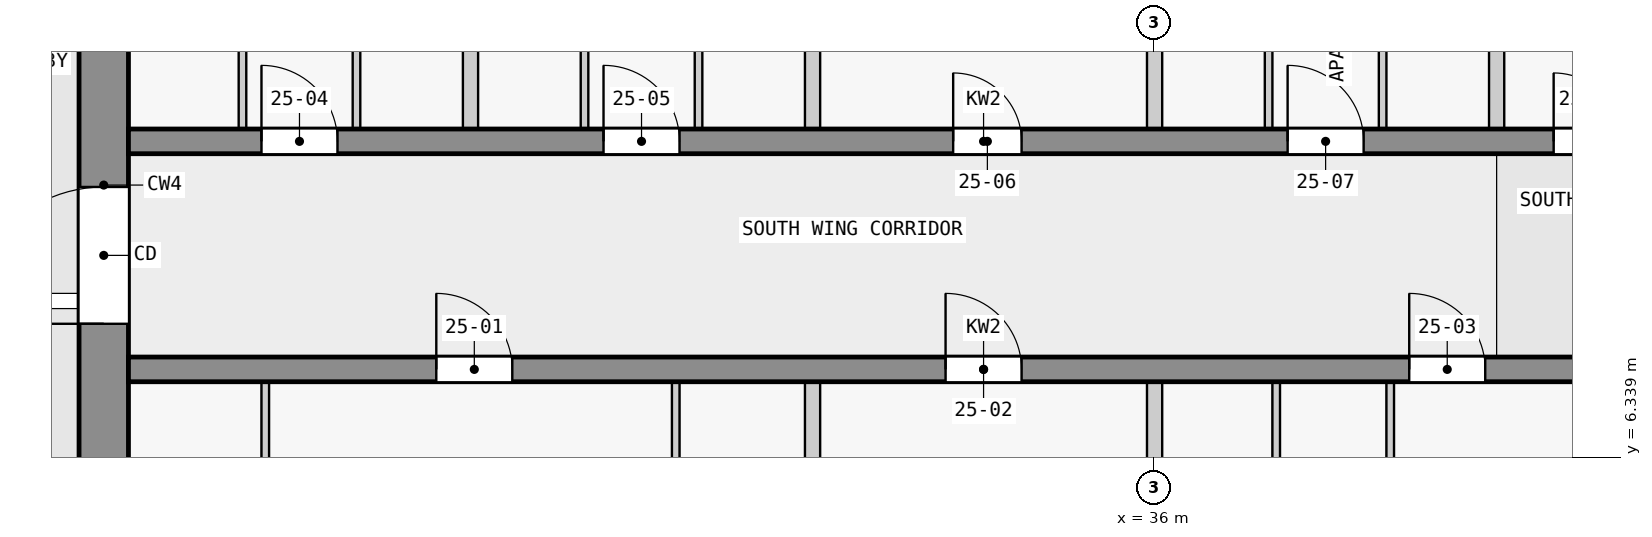
"""IFC4 building model, lengths in metres.
Left out: names, types, materials, properties, quantities, classifications, styles, units other than length and angle.
Written with IfcOpenShell. Run it as: python <this file> out.ifc"""

import sys

from ifc_helpers import new_model, si_unit, direction, frame, frame_2d, origin, place, context, subcontext, project, spatial, rectangle, extrude, element, fill, save


model = new_model("IFC4")
c1 = context("Model", 3, precision=1e-05, world=origin(), true_north=direction((0.0, 1.0)))
c2 = subcontext(c1, "Body", "Model", "MODEL_VIEW")
j1 = project(units=[si_unit("LENGTHUNIT", "METRE"), si_unit("PLANEANGLEUNIT", "RADIAN")], contexts=[c1])
p1 = place(None, origin())
s1 = spatial("IfcSite", under=j1, at=p1, CompositionType="ELEMENT")
p2 = place(p1, origin())
s2 = spatial("IfcBuilding", under=s1, at=p2, CompositionType="ELEMENT")
p3 = place(p2, frame((0.0, 0.0, 99.3)))
s3 = spatial("IfcBuildingStorey", under=s2, at=p3, CompositionType="ELEMENT", Elevation=99.3)
p4 = place(p3, frame((22.175, 2.5, 0.0), z_axis=(0.0, 0.0, 1.0), x_axis=(0.0, 1.0, 0.0)))
e1 = element("IfcWall", 1, at=p4, inside=s3, PredefinedType="SHEAR", context=c2, shape_type="SweptSolid", body=[
    extrude(rectangle(XDim=14.85, YDim=0.65, at=frame_2d((7.425, 0.0))), origin(), (0.0, 0.0, 1.0), 3.25),
])
p5 = place(p4, frame((5.6, 0.0, 0.0)))
e2 = element("IfcOpeningElement", 2, at=p5, cuts=e1, PredefinedType="OPENING", context=c2, shape_type="SweptSolid", body=[
    extrude(rectangle(XDim=1.8, YDim=2.1, at=frame_2d((0.9, 1.05))), frame((0.0, 0.335, 0.0), z_axis=(0.0, -1.0, 0.0), x_axis=(1.0, 0.0, 0.0)), (0.0, 0.0, 1.0), 0.67),
])
p6 = place(p3, frame((22.5, 7.5, 0.0), z_axis=(0.0, 0.0, 1.0), x_axis=(1.0, 0.0, 0.0)))
e3 = element("IfcWall", 3, at=p6, inside=s3, PredefinedType="SHEAR", context=c2, shape_type="SweptSolid", body=[
    extrude(rectangle(XDim=22.5, YDim=0.325, at=frame_2d((11.25, 0.0))), origin(), (0.0, 0.0, 1.0), 3.25),
])
p7 = place(p6, frame((4.05, 0.0, 0.0)))
e4 = element("IfcOpeningElement", 4, at=p7, cuts=e3, PredefinedType="OPENING", context=c2, shape_type="SweptSolid", body=[
    extrude(rectangle(XDim=1.0, YDim=2.1, at=frame_2d((0.5, 1.05))), frame((0.0, 0.172, 0.0), z_axis=(0.0, -1.0, 0.0), x_axis=(1.0, 0.0, 0.0)), (0.0, 0.0, 1.0), 0.345),
])
p8 = place(p6, frame((10.75, 0.0, 0.0)))
e5 = element("IfcOpeningElement", 5, at=p8, cuts=e3, PredefinedType="OPENING", context=c2, shape_type="SweptSolid", body=[
    extrude(rectangle(XDim=1.0, YDim=2.1, at=frame_2d((0.5, 1.05))), frame((0.0, 0.172, 0.0), z_axis=(0.0, -1.0, 0.0), x_axis=(1.0, 0.0, 0.0)), (0.0, 0.0, 1.0), 0.345),
])
p9 = place(p6, frame((16.85, 0.0, 0.0)))
e6 = element("IfcOpeningElement", 6, at=p9, cuts=e3, PredefinedType="OPENING", context=c2, shape_type="SweptSolid", body=[
    extrude(rectangle(XDim=1.0, YDim=2.1, at=frame_2d((0.5, 1.05))), frame((0.0, 0.172, 0.0), z_axis=(0.0, -1.0, 0.0), x_axis=(1.0, 0.0, 0.0)), (0.0, 0.0, 1.0), 0.345),
])
p10 = place(p3, frame((22.5, 10.5, 0.0), z_axis=(0.0, 0.0, 1.0), x_axis=(1.0, 0.0, 0.0)))
e7 = element("IfcWall", 7, at=p10, inside=s3, PredefinedType="SHEAR", context=c2, shape_type="SweptSolid", body=[
    extrude(rectangle(XDim=22.5, YDim=0.325, at=frame_2d((11.25, 0.0))), origin(), (0.0, 0.0, 1.0), 3.25),
])
p11 = place(p10, frame((1.75, 0.0, 0.0)))
e8 = element("IfcOpeningElement", 8, at=p11, cuts=e7, PredefinedType="OPENING", context=c2, shape_type="SweptSolid", body=[
    extrude(rectangle(XDim=1.0, YDim=2.1, at=frame_2d((0.5, 1.05))), frame((0.0, 0.172, 0.0), z_axis=(0.0, -1.0, 0.0), x_axis=(1.0, 0.0, 0.0)), (0.0, 0.0, 1.0), 0.345),
])
p12 = place(p10, frame((6.25, 0.0, 0.0)))
e9 = element("IfcOpeningElement", 9, at=p12, cuts=e7, PredefinedType="OPENING", context=c2, shape_type="SweptSolid", body=[
    extrude(rectangle(XDim=1.0, YDim=2.1, at=frame_2d((0.5, 1.05))), frame((0.0, 0.172, 0.0), z_axis=(0.0, -1.0, 0.0), x_axis=(1.0, 0.0, 0.0)), (0.0, 0.0, 1.0), 0.345),
])
p13 = place(p10, frame((10.85, 0.0, 0.0)))
e10 = element("IfcOpeningElement", 10, at=p13, cuts=e7, PredefinedType="OPENING", context=c2, shape_type="SweptSolid", body=[
    extrude(rectangle(XDim=0.9, YDim=2.1, at=frame_2d((0.45, 1.05))), frame((0.0, 0.172, 0.0), z_axis=(0.0, -1.0, 0.0), x_axis=(1.0, 0.0, 0.0)), (0.0, 0.0, 1.0), 0.345),
])
p14 = place(p10, frame((15.25, 0.0, 0.0)))
e11 = element("IfcOpeningElement", 11, at=p14, cuts=e7, PredefinedType="OPENING", context=c2, shape_type="SweptSolid", body=[
    extrude(rectangle(XDim=1.0, YDim=2.1, at=frame_2d((0.5, 1.05))), frame((0.0, 0.172, 0.0), z_axis=(0.0, -1.0, 0.0), x_axis=(1.0, 0.0, 0.0)), (0.0, 0.0, 1.0), 0.345),
])
p15 = place(p10, frame((18.75, 0.0, 0.0)))
e12 = element("IfcOpeningElement", 12, at=p15, cuts=e7, PredefinedType="OPENING", context=c2, shape_type="SweptSolid", body=[
    extrude(rectangle(XDim=0.9, YDim=2.1, at=frame_2d((0.45, 1.05))), frame((0.0, 0.172, 0.0), z_axis=(0.0, -1.0, 0.0), x_axis=(1.0, 0.0, 0.0)), (0.0, 0.0, 1.0), 0.345),
])
p16 = place(p10, frame((20.95, 0.0, 0.0)))
e13 = element("IfcOpeningElement", 13, at=p16, cuts=e7, PredefinedType="OPENING", context=c2, shape_type="SweptSolid", body=[
    extrude(rectangle(XDim=1.0, YDim=2.1, at=frame_2d((0.5, 1.05))), frame((0.0, 0.172, 0.0), z_axis=(0.0, -1.0, 0.0), x_axis=(1.0, 0.0, 0.0)), (0.0, 0.0, 1.0), 0.345),
])
p17 = place(p3, frame((24.0, 10.663, 0.0), z_axis=(0.0, 0.0, 1.0), x_axis=(0.0, 1.0, 0.0)))
e14 = element("IfcWall", 14, at=p17, inside=s3, PredefinedType="PARTITIONING", context=c2, shape_type="SweptSolid", body=[
    extrude(rectangle(XDim=3.4, YDim=0.1, at=frame_2d((1.7, 0.0))), origin(), (0.0, 0.0, 1.0), 3.25),
])
p18 = place(p17, frame((1.25, 0.0, 0.0)))
e15 = element("IfcOpeningElement", 15, at=p18, cuts=e14, PredefinedType="OPENING", context=c2, shape_type="SweptSolid", body=[
    extrude(rectangle(XDim=0.9, YDim=2.1, at=frame_2d((0.45, 1.05))), frame((0.0, 0.06, 0.0), z_axis=(0.0, -1.0, 0.0), x_axis=(1.0, 0.0, 0.0)), (0.0, 0.0, 1.0), 0.12),
])
p19 = place(p3, frame((24.3, 3.938, 0.0), z_axis=(0.0, 0.0, 1.0), x_axis=(0.0, 1.0, 0.0)))
e16 = element("IfcWall", 16, at=p19, inside=s3, PredefinedType="PARTITIONING", context=c2, shape_type="SweptSolid", body=[
    extrude(rectangle(XDim=3.4, YDim=0.1, at=frame_2d((1.7, 0.0))), origin(), (0.0, 0.0, 1.0), 3.25),
])
p20 = place(p19, frame((1.25, 0.0, 0.0)))
e17 = element("IfcOpeningElement", 17, at=p20, cuts=e16, PredefinedType="OPENING", context=c2, shape_type="SweptSolid", body=[
    extrude(rectangle(XDim=0.9, YDim=2.1, at=frame_2d((0.45, 1.05))), frame((0.0, 0.06, 0.0), z_axis=(0.0, -1.0, 0.0), x_axis=(1.0, 0.0, 0.0)), (0.0, 0.0, 1.0), 0.12),
])
p21 = place(p3, frame((25.5, 14.062, 0.0), z_axis=(0.0, 0.0, 1.0), x_axis=(0.0, -1.0, 0.0)))
e18 = element("IfcWall", 18, at=p21, inside=s3, PredefinedType="PARTITIONING", context=c2, shape_type="SweptSolid", body=[
    extrude(rectangle(XDim=3.4, YDim=0.1, at=frame_2d((1.7, 0.0))), origin(), (0.0, 0.0, 1.0), 3.25),
])
p22 = place(p21, frame((1.25, 0.0, 0.0)))
e19 = element("IfcOpeningElement", 19, at=p22, cuts=e18, PredefinedType="OPENING", context=c2, shape_type="SweptSolid", body=[
    extrude(rectangle(XDim=0.9, YDim=2.1, at=frame_2d((0.45, 1.05))), frame((0.0, 0.06, 0.0), z_axis=(0.0, -1.0, 0.0), x_axis=(1.0, 0.0, 0.0)), (0.0, 0.0, 1.0), 0.12),
])
p23 = place(p3, frame((27.0, 10.663, 0.0), z_axis=(0.0, 0.0, 1.0), x_axis=(0.0, 1.0, 0.0)))
e20 = element("IfcWall", 20, at=p23, inside=s3, PredefinedType="PARTITIONING", context=c2, shape_type="SweptSolid", body=[
    extrude(rectangle(XDim=3.4, YDim=0.2, at=frame_2d((1.7, 0.0))), origin(), (0.0, 0.0, 1.0), 3.25),
])
p24 = place(p3, frame((28.5, 10.663, 0.0), z_axis=(0.0, 0.0, 1.0), x_axis=(0.0, 1.0, 0.0)))
e21 = element("IfcWall", 21, at=p24, inside=s3, PredefinedType="PARTITIONING", context=c2, shape_type="SweptSolid", body=[
    extrude(rectangle(XDim=3.4, YDim=0.1, at=frame_2d((1.7, 0.0))), origin(), (0.0, 0.0, 1.0), 3.25),
])
p25 = place(p24, frame((1.25, 0.0, 0.0)))
e22 = element("IfcOpeningElement", 22, at=p25, cuts=e21, PredefinedType="OPENING", context=c2, shape_type="SweptSolid", body=[
    extrude(rectangle(XDim=0.9, YDim=2.1, at=frame_2d((0.45, 1.05))), frame((0.0, 0.06, 0.0), z_axis=(0.0, -1.0, 0.0), x_axis=(1.0, 0.0, 0.0)), (0.0, 0.0, 1.0), 0.12),
])
p26 = place(p3, frame((29.7, 7.337, 0.0), z_axis=(0.0, 0.0, 1.0), x_axis=(0.0, -1.0, 0.0)))
e23 = element("IfcWall", 23, at=p26, inside=s3, PredefinedType="PARTITIONING", context=c2, shape_type="SweptSolid", body=[
    extrude(rectangle(XDim=3.4, YDim=0.1, at=frame_2d((1.7, 0.0))), origin(), (0.0, 0.0, 1.0), 3.25),
])
p27 = place(p26, frame((1.25, 0.0, 0.0)))
e24 = element("IfcOpeningElement", 24, at=p27, cuts=e23, PredefinedType="OPENING", context=c2, shape_type="SweptSolid", body=[
    extrude(rectangle(XDim=0.9, YDim=2.1, at=frame_2d((0.45, 1.05))), frame((0.0, 0.06, 0.0), z_axis=(0.0, -1.0, 0.0), x_axis=(1.0, 0.0, 0.0)), (0.0, 0.0, 1.0), 0.12),
])
p28 = place(p3, frame((30.0, 14.062, 0.0), z_axis=(0.0, 0.0, 1.0), x_axis=(0.0, -1.0, 0.0)))
e25 = element("IfcWall", 25, at=p28, inside=s3, PredefinedType="PARTITIONING", context=c2, shape_type="SweptSolid", body=[
    extrude(rectangle(XDim=3.4, YDim=0.1, at=frame_2d((1.7, 0.0))), origin(), (0.0, 0.0, 1.0), 3.25),
])
p29 = place(p28, frame((1.25, 0.0, 0.0)))
e26 = element("IfcOpeningElement", 26, at=p29, cuts=e25, PredefinedType="OPENING", context=c2, shape_type="SweptSolid", body=[
    extrude(rectangle(XDim=0.9, YDim=2.1, at=frame_2d((0.45, 1.05))), frame((0.0, 0.06, 0.0), z_axis=(0.0, -1.0, 0.0), x_axis=(1.0, 0.0, 0.0)), (0.0, 0.0, 1.0), 0.12),
])
p30 = place(p3, frame((31.5, 1.122, 0.0), z_axis=(0.0, 0.0, 1.0), x_axis=(0.0, 1.0, 0.0)))
e27 = element("IfcWall", 27, at=p30, inside=s3, PredefinedType="PARTITIONING", context=c2, shape_type="SweptSolid", body=[
    extrude(rectangle(XDim=6.215, YDim=0.2, at=frame_2d((3.107, 0.0))), origin(), (0.0, 0.0, 1.0), 3.25),
])
p31 = place(p3, frame((31.5, 10.663, 0.0), z_axis=(0.0, 0.0, 1.0), x_axis=(0.0, 1.0, 0.0)))
e28 = element("IfcWall", 28, at=p31, inside=s3, PredefinedType="PARTITIONING", context=c2, shape_type="SweptSolid", body=[
    extrude(rectangle(XDim=3.4, YDim=0.2, at=frame_2d((1.7, 0.0))), origin(), (0.0, 0.0, 1.0), 3.25),
])
for number, where, z_axis, x_axis in (
    (29, (36.0, 1.4, 0.0), (0.0, 0.0, 1.0), (0.0, 1.0, 0.0)),
    (30, (36.0, 10.663, 0.0), (0.0, 0.0, 1.0), (0.0, 1.0, 0.0)),
):
    element("IfcWall", number, at=place(p3, frame(where, z_axis=z_axis, x_axis=x_axis)), inside=s3, PredefinedType="PARTITIONING", context=c2, shape_type="SweptSolid", body=[
        extrude(rectangle(XDim=5.938, YDim=0.2, at=frame_2d((2.969, 0.0))), origin(), (0.0, 0.0, 1.0), 3.25),
    ])
p32 = place(p3, frame((37.5, 10.663, 0.0), z_axis=(0.0, 0.0, 1.0), x_axis=(0.0, 1.0, 0.0)))
e31 = element("IfcWall", 31, at=p32, inside=s3, PredefinedType="PARTITIONING", context=c2, shape_type="SweptSolid", body=[
    extrude(rectangle(XDim=3.4, YDim=0.1, at=frame_2d((1.7, 0.0))), origin(), (0.0, 0.0, 1.0), 3.25),
])
p33 = place(p32, frame((1.25, 0.0, 0.0)))
e32 = element("IfcOpeningElement", 32, at=p33, cuts=e31, PredefinedType="OPENING", context=c2, shape_type="SweptSolid", body=[
    extrude(rectangle(XDim=0.9, YDim=2.1, at=frame_2d((0.45, 1.05))), frame((0.0, 0.06, 0.0), z_axis=(0.0, -1.0, 0.0), x_axis=(1.0, 0.0, 0.0)), (0.0, 0.0, 1.0), 0.12),
])
p34 = place(p3, frame((37.6, 3.938, 0.0), z_axis=(0.0, 0.0, 1.0), x_axis=(0.0, 1.0, 0.0)))
e33 = element("IfcWall", 33, at=p34, inside=s3, PredefinedType="PARTITIONING", context=c2, shape_type="SweptSolid", body=[
    extrude(rectangle(XDim=3.4, YDim=0.1, at=frame_2d((1.7, 0.0))), origin(), (0.0, 0.0, 1.0), 3.25),
])
p35 = place(p3, frame((39.0, 14.062, 0.0), z_axis=(0.0, 0.0, 1.0), x_axis=(0.0, -1.0, 0.0)))
e34 = element("IfcWall", 34, at=p35, inside=s3, PredefinedType="PARTITIONING", context=c2, shape_type="SweptSolid", body=[
    extrude(rectangle(XDim=3.4, YDim=0.1, at=frame_2d((1.7, 0.0))), origin(), (0.0, 0.0, 1.0), 3.25),
])
p36 = place(p35, frame((1.25, 0.0, 0.0)))
e35 = element("IfcOpeningElement", 35, at=p36, cuts=e34, PredefinedType="OPENING", context=c2, shape_type="SweptSolid", body=[
    extrude(rectangle(XDim=0.9, YDim=2.1, at=frame_2d((0.45, 1.05))), frame((0.0, 0.06, 0.0), z_axis=(0.0, -1.0, 0.0), x_axis=(1.0, 0.0, 0.0)), (0.0, 0.0, 1.0), 0.12),
])
p37 = place(p3, frame((39.1, 3.938, 0.0), z_axis=(0.0, 0.0, 1.0), x_axis=(0.0, 1.0, 0.0)))
e36 = element("IfcWall", 36, at=p37, inside=s3, PredefinedType="PARTITIONING", context=c2, shape_type="SweptSolid", body=[
    extrude(rectangle(XDim=3.4, YDim=0.1, at=frame_2d((1.7, 0.0))), origin(), (0.0, 0.0, 1.0), 3.25),
])
p38 = place(p37, frame((1.25, 0.0, 0.0)))
e37 = element("IfcOpeningElement", 37, at=p38, cuts=e36, PredefinedType="OPENING", context=c2, shape_type="SweptSolid", body=[
    extrude(rectangle(XDim=0.9, YDim=2.1, at=frame_2d((0.45, 1.05))), frame((0.0, 0.06, 0.0), z_axis=(0.0, -1.0, 0.0), x_axis=(1.0, 0.0, 0.0)), (0.0, 0.0, 1.0), 0.12),
])
p39 = place(p3, frame((40.5, 10.663, 0.0), z_axis=(0.0, 0.0, 1.0), x_axis=(0.0, 1.0, 0.0)))
e38 = element("IfcWall", 38, at=p39, inside=s3, PredefinedType="PARTITIONING", context=c2, shape_type="SweptSolid", body=[
    extrude(rectangle(XDim=3.4, YDim=0.2, at=frame_2d((1.7, 0.0))), origin(), (0.0, 0.0, 1.0), 3.25),
])
p40 = place(p5, origin())
e39 = element("IfcDoor", 39, at=p40, inside=s3, OperationType="DOUBLE_DOOR_SINGLE_SWING", PredefinedType="DOOR", context=c2, shape_type="SweptSolid", body=[
    extrude(rectangle(XDim=1.8, YDim=2.1, at=frame_2d((0.9, 1.05))), frame((0.0, 0.025, 0.0), z_axis=(0.0, -1.0, 0.0), x_axis=(1.0, 0.0, 0.0)), (0.0, 0.0, 1.0), 0.05),
])
fill(e2, e39)
p41 = place(p7, origin())
e40 = element("IfcDoor", 40, at=p41, inside=s3, OperationType="SINGLE_SWING_LEFT", PredefinedType="DOOR", context=c2, shape_type="SweptSolid", body=[
    extrude(rectangle(XDim=1.0, YDim=2.1, at=frame_2d((0.5, 1.05))), frame((0.0, 0.025, 0.0), z_axis=(0.0, -1.0, 0.0), x_axis=(1.0, 0.0, 0.0)), (0.0, 0.0, 1.0), 0.05),
])
fill(e4, e40)
p42 = place(p8, origin())
e41 = element("IfcDoor", 41, at=p42, inside=s3, OperationType="SINGLE_SWING_LEFT", PredefinedType="DOOR", context=c2, shape_type="SweptSolid", body=[
    extrude(rectangle(XDim=1.0, YDim=2.1, at=frame_2d((0.5, 1.05))), frame((0.0, 0.025, 0.0), z_axis=(0.0, -1.0, 0.0), x_axis=(1.0, 0.0, 0.0)), (0.0, 0.0, 1.0), 0.05),
])
fill(e5, e41)
p43 = place(p9, origin())
e42 = element("IfcDoor", 42, at=p43, inside=s3, OperationType="SINGLE_SWING_RIGHT", PredefinedType="DOOR", context=c2, shape_type="SweptSolid", body=[
    extrude(rectangle(XDim=1.0, YDim=2.1, at=frame_2d((0.5, 1.05))), frame((0.0, 0.025, 0.0), z_axis=(0.0, -1.0, 0.0), x_axis=(1.0, 0.0, 0.0)), (0.0, 0.0, 1.0), 0.05),
])
fill(e6, e42)
p44 = place(p11, origin())
e43 = element("IfcDoor", 43, at=p44, inside=s3, OperationType="SINGLE_SWING_LEFT", PredefinedType="DOOR", context=c2, shape_type="SweptSolid", body=[
    extrude(rectangle(XDim=1.0, YDim=2.1, at=frame_2d((0.5, 1.05))), frame((0.0, 0.025, 0.0), z_axis=(0.0, -1.0, 0.0), x_axis=(1.0, 0.0, 0.0)), (0.0, 0.0, 1.0), 0.05),
])
fill(e8, e43)
p45 = place(p12, origin())
e44 = element("IfcDoor", 44, at=p45, inside=s3, OperationType="SINGLE_SWING_LEFT", PredefinedType="DOOR", context=c2, shape_type="SweptSolid", body=[
    extrude(rectangle(XDim=1.0, YDim=2.1, at=frame_2d((0.5, 1.05))), frame((0.0, 0.025, 0.0), z_axis=(0.0, -1.0, 0.0), x_axis=(1.0, 0.0, 0.0)), (0.0, 0.0, 1.0), 0.05),
])
fill(e9, e44)
p46 = place(p13, origin())
e45 = element("IfcDoor", 45, at=p46, inside=s3, OperationType="SINGLE_SWING_RIGHT", PredefinedType="DOOR", context=c2, shape_type="SweptSolid", body=[
    extrude(rectangle(XDim=0.9, YDim=2.1, at=frame_2d((0.45, 1.05))), frame((0.0, 0.025, 0.0), z_axis=(0.0, -1.0, 0.0), x_axis=(1.0, 0.0, 0.0)), (0.0, 0.0, 1.0), 0.05),
])
fill(e10, e45)
p47 = place(p14, origin())
e46 = element("IfcDoor", 46, at=p47, inside=s3, OperationType="SINGLE_SWING_RIGHT", PredefinedType="DOOR", context=c2, shape_type="SweptSolid", body=[
    extrude(rectangle(XDim=1.0, YDim=2.1, at=frame_2d((0.5, 1.05))), frame((0.0, 0.025, 0.0), z_axis=(0.0, -1.0, 0.0), x_axis=(1.0, 0.0, 0.0)), (0.0, 0.0, 1.0), 0.05),
])
fill(e11, e46)
p48 = place(p15, origin())
e47 = element("IfcDoor", 47, at=p48, inside=s3, OperationType="SINGLE_SWING_RIGHT", PredefinedType="DOOR", context=c2, shape_type="SweptSolid", body=[
    extrude(rectangle(XDim=0.9, YDim=2.1, at=frame_2d((0.45, 1.05))), frame((0.0, 0.025, 0.0), z_axis=(0.0, -1.0, 0.0), x_axis=(1.0, 0.0, 0.0)), (0.0, 0.0, 1.0), 0.05),
])
fill(e12, e47)
save(model, sys.argv[1])
